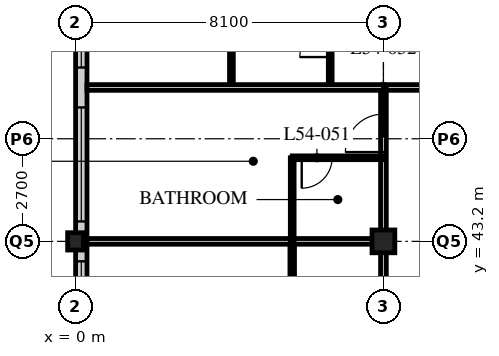
"""IFC4 building model, lengths in metres.
Left out: names, types, materials, properties, quantities, classifications, styles, units other than length and angle.
Written with IfcOpenShell. Run it as: python <this file> out.ifc"""

import sys

from ifc_helpers import new_model, si_unit, direction, frame, frame_2d, origin, origin_2d, place, context, subcontext, project, spatial, rectangle, hollow_rectangle, i_section, extrude, element, fill, save


model = new_model("IFC4")
c1 = context("Model", 3, precision=1e-05, world=origin(), true_north=direction((0.0, 1.0)))
c2 = subcontext(c1, "Body", "Model", "MODEL_VIEW")
j1 = project(units=[si_unit("LENGTHUNIT", "METRE"), si_unit("PLANEANGLEUNIT", "RADIAN")], contexts=[c1])
p1 = place(None, origin())
s1 = spatial("IfcSite", under=j1, at=p1, CompositionType="ELEMENT")
p2 = place(p1, origin())
s2 = spatial("IfcBuilding", under=s1, at=p2, CompositionType="ELEMENT")
p3 = place(p2, frame((0.0, 0.0, 210.0)))
s3 = spatial("IfcBuildingStorey", under=s2, at=p3, CompositionType="ELEMENT", Elevation=210.0)
p4 = place(p3, frame((0.0, 43.2, 0.0), z_axis=(0.0, 0.0, 1.0), x_axis=(1.0, 0.0, 0.0)))
e1 = element("IfcColumn", 1, at=p4, inside=s3, PredefinedType="COLUMN", context=c2, shape_type="SweptSolid", body=[
    extrude(i_section(OverallWidth=0.418, OverallDepth=0.456, WebThickness=0.042, FlangeThickness=0.067, FilletRadius=0.015, at=origin_2d()), origin(), (0.0, 0.0, 1.0), 3.6),
])
p5 = place(p3, frame((8.1, 43.2, 0.0), z_axis=(0.0, 0.0, 1.0), x_axis=(1.0, 0.0, 0.0)))
e2 = element("IfcColumn", 2, at=p5, inside=s3, PredefinedType="COLUMN", context=c2, shape_type="SweptSolid", body=[
    extrude(hollow_rectangle(XDim=0.6, YDim=0.6, WallThickness=0.05, at=origin_2d()), origin(), (0.0, 0.0, 1.0), 3.6),
])
p6 = place(p3, frame((0.15, 51.0, 0.0), z_axis=(0.0, 0.0, 1.0), x_axis=(0.0, -1.0, 0.0)))
e3 = element("IfcWall", 3, at=p6, inside=s3, PredefinedType="SOLIDWALL", context=c2, shape_type="SweptSolid", body=[
    extrude(rectangle(XDim=32.1, YDim=0.3, at=frame_2d((16.05, 0.0))), origin(), (0.0, 0.0, 1.0), 3.39),
])
p7 = place(p6, frame((0.225, 0.0, 0.6)))
e4 = element("IfcOpeningElement", 4, at=p7, cuts=e3, PredefinedType="OPENING", context=c2, shape_type="SweptSolid", body=[
    extrude(rectangle(XDim=3.0, YDim=2.4, at=frame_2d((1.5, 1.2))), frame((0.0, 0.16, 0.0), z_axis=(0.0, -1.0, 0.0), x_axis=(1.0, 0.0, 0.0)), (0.0, 0.0, 1.0), 0.32),
])
p8 = place(p6, frame((4.275, 0.0, 0.6)))
e5 = element("IfcOpeningElement", 5, at=p8, cuts=e3, PredefinedType="OPENING", context=c2, shape_type="SweptSolid", body=[
    extrude(rectangle(XDim=3.0, YDim=2.4, at=frame_2d((1.5, 1.2))), frame((0.0, 0.16, 0.0), z_axis=(0.0, -1.0, 0.0), x_axis=(1.0, 0.0, 0.0)), (0.0, 0.0, 1.0), 0.32),
])
p9 = place(p6, frame((8.325, 0.0, 0.6)))
e6 = element("IfcOpeningElement", 6, at=p9, cuts=e3, PredefinedType="OPENING", context=c2, shape_type="SweptSolid", body=[
    extrude(rectangle(XDim=3.0, YDim=2.4, at=frame_2d((1.5, 1.2))), frame((0.0, 0.16, 0.0), z_axis=(0.0, -1.0, 0.0), x_axis=(1.0, 0.0, 0.0)), (0.0, 0.0, 1.0), 0.32),
])
p10 = place(p6, frame((12.375, 0.0, 0.6)))
e7 = element("IfcOpeningElement", 7, at=p10, cuts=e3, PredefinedType="OPENING", context=c2, shape_type="SweptSolid", body=[
    extrude(rectangle(XDim=3.0, YDim=2.4, at=frame_2d((1.5, 1.2))), frame((0.0, 0.16, 0.0), z_axis=(0.0, -1.0, 0.0), x_axis=(1.0, 0.0, 0.0)), (0.0, 0.0, 1.0), 0.32),
])
p11 = place(p6, frame((16.425, 0.0, 0.6)))
e8 = element("IfcOpeningElement", 8, at=p11, cuts=e3, PredefinedType="OPENING", context=c2, shape_type="SweptSolid", body=[
    extrude(rectangle(XDim=3.0, YDim=2.4, at=frame_2d((1.5, 1.2))), frame((0.0, 0.16, 0.0), z_axis=(0.0, -1.0, 0.0), x_axis=(1.0, 0.0, 0.0)), (0.0, 0.0, 1.0), 0.32),
])
p12 = place(p6, frame((20.475, 0.0, 0.6)))
e9 = element("IfcOpeningElement", 9, at=p12, cuts=e3, PredefinedType="OPENING", context=c2, shape_type="SweptSolid", body=[
    extrude(rectangle(XDim=3.0, YDim=2.4, at=frame_2d((1.5, 1.2))), frame((0.0, 0.16, 0.0), z_axis=(0.0, -1.0, 0.0), x_axis=(1.0, 0.0, 0.0)), (0.0, 0.0, 1.0), 0.32),
])
p13 = place(p6, frame((24.525, 0.0, 0.6)))
e10 = element("IfcOpeningElement", 10, at=p13, cuts=e3, PredefinedType="OPENING", context=c2, shape_type="SweptSolid", body=[
    extrude(rectangle(XDim=3.0, YDim=2.4, at=frame_2d((1.5, 1.2))), frame((0.0, 0.16, 0.0), z_axis=(0.0, -1.0, 0.0), x_axis=(1.0, 0.0, 0.0)), (0.0, 0.0, 1.0), 0.32),
])
p14 = place(p6, frame((28.575, 0.0, 0.6)))
e11 = element("IfcOpeningElement", 11, at=p14, cuts=e3, PredefinedType="OPENING", context=c2, shape_type="SweptSolid", body=[
    extrude(rectangle(XDim=3.0, YDim=2.4, at=frame_2d((1.5, 1.2))), frame((0.0, 0.16, 0.0), z_axis=(0.0, -1.0, 0.0), x_axis=(1.0, 0.0, 0.0)), (0.0, 0.0, 1.0), 0.32),
])
p15 = place(p3, frame((8.1, 47.25, 0.0), z_axis=(0.0, 0.0, 1.0), x_axis=(1.0, 0.0, 0.0)))
e12 = element("IfcWall", 12, at=p15, inside=s3, PredefinedType="PARTITIONING", context=c2, shape_type="SweptSolid", body=[
    extrude(rectangle(XDim=36.45, YDim=0.15, at=frame_2d((18.225, 0.0))), origin(), (0.0, 0.0, 1.0), 3.39),
])
p16 = place(p15, frame((4.45, 0.0, 0.0)))
e13 = element("IfcOpeningElement", 13, at=p16, cuts=e12, PredefinedType="OPENING", context=c2, shape_type="SweptSolid", body=[
    extrude(rectangle(XDim=1.0, YDim=2.1, at=frame_2d((0.5, 1.05))), frame((0.0, 0.085, 0.0), z_axis=(0.0, -1.0, 0.0), x_axis=(1.0, 0.0, 0.0)), (0.0, 0.0, 1.0), 0.17),
])
p17 = place(p15, frame((12.55, 0.0, 0.0)))
e14 = element("IfcOpeningElement", 14, at=p17, cuts=e12, PredefinedType="OPENING", context=c2, shape_type="SweptSolid", body=[
    extrude(rectangle(XDim=1.0, YDim=2.1, at=frame_2d((0.5, 1.05))), frame((0.0, 0.085, 0.0), z_axis=(0.0, -1.0, 0.0), x_axis=(1.0, 0.0, 0.0)), (0.0, 0.0, 1.0), 0.17),
])
p18 = place(p15, frame((30.7, 0.0, 0.0)))
e15 = element("IfcOpeningElement", 15, at=p18, cuts=e12, PredefinedType="OPENING", context=c2, shape_type="SweptSolid", body=[
    extrude(rectangle(XDim=1.0, YDim=2.1, at=frame_2d((0.5, 1.05))), frame((0.0, 0.085, 0.0), z_axis=(0.0, -1.0, 0.0), x_axis=(1.0, 0.0, 0.0)), (0.0, 0.0, 1.0), 0.17),
])
p19 = place(p15, frame((33.925, 0.0, 0.0)))
e16 = element("IfcOpeningElement", 16, at=p19, cuts=e12, PredefinedType="OPENING", context=c2, shape_type="SweptSolid", body=[
    extrude(rectangle(XDim=1.0, YDim=2.1, at=frame_2d((0.5, 1.05))), frame((0.0, 0.085, 0.0), z_axis=(0.0, -1.0, 0.0), x_axis=(1.0, 0.0, 0.0)), (0.0, 0.0, 1.0), 0.17),
])
p20 = place(p15, frame((1.525, 0.0, 0.0)))
e17 = element("IfcOpeningElement", 17, at=p20, cuts=e12, PredefinedType="OPENING", context=c2, shape_type="SweptSolid", body=[
    extrude(rectangle(XDim=1.0, YDim=2.1, at=frame_2d((0.5, 1.05))), frame((0.0, 0.085, 0.0), z_axis=(0.0, -1.0, 0.0), x_axis=(1.0, 0.0, 0.0)), (0.0, 0.0, 1.0), 0.17),
])
p21 = place(p3, frame((8.1, 18.9, 0.0), z_axis=(0.0, 0.0, 1.0), x_axis=(0.0, 1.0, 0.0)))
e18 = element("IfcWall", 18, at=p21, inside=s3, PredefinedType="PARTITIONING", context=c2, shape_type="SweptSolid", body=[
    extrude(rectangle(XDim=28.35, YDim=0.15, at=frame_2d((14.175, 0.0))), origin(), (0.0, 0.0, 1.0), 2.778),
])
p22 = place(p21, frame((0.9, 0.0, 0.0)))
e19 = element("IfcOpeningElement", 19, at=p22, cuts=e18, PredefinedType="OPENING", context=c2, shape_type="SweptSolid", body=[
    extrude(rectangle(XDim=1.0, YDim=2.1, at=frame_2d((0.5, 1.05))), frame((0.0, 0.085, 0.0), z_axis=(0.0, -1.0, 0.0), x_axis=(1.0, 0.0, 0.0)), (0.0, 0.0, 1.0), 0.17),
])
p23 = place(p21, frame((17.1, 0.0, 0.0)))
e20 = element("IfcOpeningElement", 20, at=p23, cuts=e18, PredefinedType="OPENING", context=c2, shape_type="SweptSolid", body=[
    extrude(rectangle(XDim=1.0, YDim=2.1, at=frame_2d((0.5, 1.05))), frame((0.0, 0.085, 0.0), z_axis=(0.0, -1.0, 0.0), x_axis=(1.0, 0.0, 0.0)), (0.0, 0.0, 1.0), 0.17),
])
p24 = place(p21, frame((26.65, 0.0, 0.0)))
e21 = element("IfcOpeningElement", 21, at=p24, cuts=e18, PredefinedType="OPENING", context=c2, shape_type="SweptSolid", body=[
    extrude(rectangle(XDim=1.0, YDim=2.1, at=frame_2d((0.5, 1.05))), frame((0.0, 0.085, 0.0), z_axis=(0.0, -1.0, 0.0), x_axis=(1.0, 0.0, 0.0)), (0.0, 0.0, 1.0), 0.17),
])
p25 = place(p3, frame((5.7, 18.9, 0.0), z_axis=(0.0, 0.0, 1.0), x_axis=(0.0, 1.0, 0.0)))
e22 = element("IfcWall", 22, at=p25, inside=s3, PredefinedType="PARTITIONING", context=c2, shape_type="SweptSolid", body=[
    extrude(rectangle(XDim=24.3, YDim=0.12, at=frame_2d((12.15, 0.0))), origin(), (0.0, 0.0, 1.0), 3.39),
])
p26 = place(p25, frame((0.975, 0.0, 0.0)))
e23 = element("IfcOpeningElement", 23, at=p26, cuts=e22, PredefinedType="OPENING", context=c2, shape_type="SweptSolid", body=[
    extrude(rectangle(XDim=0.85, YDim=2.1, at=frame_2d((0.425, 1.05))), frame((0.0, 0.07, 0.0), z_axis=(0.0, -1.0, 0.0), x_axis=(1.0, 0.0, 0.0)), (0.0, 0.0, 1.0), 0.14),
])
p27 = place(p25, frame((8.425, 0.0, 0.0)))
e24 = element("IfcOpeningElement", 24, at=p27, cuts=e22, PredefinedType="OPENING", context=c2, shape_type="SweptSolid", body=[
    extrude(rectangle(XDim=0.85, YDim=2.1, at=frame_2d((0.425, 1.05))), frame((0.0, 0.07, 0.0), z_axis=(0.0, -1.0, 0.0), x_axis=(1.0, 0.0, 0.0)), (0.0, 0.0, 1.0), 0.14),
])
p28 = place(p25, frame((12.475, 0.0, 0.0)))
e25 = element("IfcOpeningElement", 25, at=p28, cuts=e22, PredefinedType="OPENING", context=c2, shape_type="SweptSolid", body=[
    extrude(rectangle(XDim=0.85, YDim=2.1, at=frame_2d((0.425, 1.05))), frame((0.0, 0.07, 0.0), z_axis=(0.0, -1.0, 0.0), x_axis=(1.0, 0.0, 0.0)), (0.0, 0.0, 1.0), 0.14),
])
p29 = place(p25, frame((17.175, 0.0, 0.0)))
e26 = element("IfcOpeningElement", 26, at=p29, cuts=e22, PredefinedType="OPENING", context=c2, shape_type="SweptSolid", body=[
    extrude(rectangle(XDim=0.85, YDim=2.1, at=frame_2d((0.425, 1.05))), frame((0.0, 0.07, 0.0), z_axis=(0.0, -1.0, 0.0), x_axis=(1.0, 0.0, 0.0)), (0.0, 0.0, 1.0), 0.14),
])
p30 = place(p25, frame((20.575, 0.0, 0.0)))
e27 = element("IfcOpeningElement", 27, at=p30, cuts=e22, PredefinedType="OPENING", context=c2, shape_type="SweptSolid", body=[
    extrude(rectangle(XDim=0.85, YDim=2.1, at=frame_2d((0.425, 1.05))), frame((0.0, 0.07, 0.0), z_axis=(0.0, -1.0, 0.0), x_axis=(1.0, 0.0, 0.0)), (0.0, 0.0, 1.0), 0.14),
])
p31 = place(p3, frame((8.1, 43.2, 0.0), z_axis=(0.0, 0.0, 1.0), x_axis=(-1.0, 0.0, 0.0)))
e28 = element("IfcWall", 28, at=p31, inside=s3, PredefinedType="PARTITIONING", context=c2, shape_type="SweptSolid", body=[
    extrude(rectangle(XDim=7.8, YDim=0.15, at=frame_2d((3.9, 0.0))), origin(), (0.0, 0.0, 1.0), 2.778),
])
p32 = place(p3, frame((5.7, 43.2, 0.0), z_axis=(0.0, 0.0, 1.0), x_axis=(0.0, 1.0, 0.0)))
e29 = element("IfcWall", 29, at=p32, inside=s3, PredefinedType="PARTITIONING", context=c2, shape_type="SweptSolid", body=[
    extrude(rectangle(XDim=2.2, YDim=0.1, at=frame_2d((1.1, 0.0))), origin(), (0.0, 0.0, 1.0), 3.39),
])
p33 = place(p3, frame((8.1, 45.4, 0.0), z_axis=(0.0, 0.0, 1.0), x_axis=(-1.0, 0.0, 0.0)))
e30 = element("IfcWall", 30, at=p33, inside=s3, PredefinedType="PARTITIONING", context=c2, shape_type="SweptSolid", body=[
    extrude(rectangle(XDim=2.4, YDim=0.1, at=frame_2d((1.2, 0.0))), origin(), (0.0, 0.0, 1.0), 3.39),
])
p34 = place(p33, frame((1.35, 0.0, 0.0)))
e31 = element("IfcOpeningElement", 31, at=p34, cuts=e30, PredefinedType="OPENING", context=c2, shape_type="SweptSolid", body=[
    extrude(rectangle(XDim=0.8, YDim=2.1, at=frame_2d((0.4, 1.05))), frame((0.0, 0.06, 0.0), z_axis=(0.0, -1.0, 0.0), x_axis=(1.0, 0.0, 0.0)), (0.0, 0.0, 1.0), 0.12),
])
p35 = place(p3, frame((6.7, 47.25, 0.0), z_axis=(0.0, 0.0, 1.0), x_axis=(0.0, 1.0, 0.0)))
e32 = element("IfcWall", 32, at=p35, inside=s3, PredefinedType="PARTITIONING", context=c2, shape_type="SweptSolid", body=[
    extrude(rectangle(XDim=2.4, YDim=0.1, at=frame_2d((1.2, 0.0))), origin(), (0.0, 0.0, 1.0), 3.39),
])
p36 = place(p35, frame((0.8, 0.0, 0.0)))
e33 = element("IfcOpeningElement", 33, at=p36, cuts=e32, PredefinedType="OPENING", context=c2, shape_type="SweptSolid", body=[
    extrude(rectangle(XDim=0.8, YDim=2.1, at=frame_2d((0.4, 1.05))), frame((0.0, 0.06, 0.0), z_axis=(0.0, -1.0, 0.0), x_axis=(1.0, 0.0, 0.0)), (0.0, 0.0, 1.0), 0.12),
])
p37 = place(p3, frame((4.1, 47.25, 0.0), z_axis=(0.0, 0.0, 1.0), x_axis=(0.0, 1.0, 0.0)))
e34 = element("IfcWall", 34, at=p37, inside=s3, PredefinedType="PARTITIONING", context=c2, shape_type="SweptSolid", body=[
    extrude(rectangle(XDim=2.4, YDim=0.1, at=frame_2d((1.2, 0.0))), origin(), (0.0, 0.0, 1.0), 3.39),
])
p38 = place(p3, frame((0.3, 47.25, 0.0), z_axis=(0.0, 0.0, 1.0), x_axis=(1.0, 0.0, 0.0)))
e35 = element("IfcWall", 35, at=p38, inside=s3, PredefinedType="PARTITIONING", context=c2, shape_type="SweptSolid", body=[
    extrude(rectangle(XDim=7.8, YDim=0.15, at=frame_2d((3.9, 0.0))), origin(), (0.0, 0.0, 1.0), 3.39),
])
p39 = place(p7, origin())
e36 = element("IfcWindow", 36, at=p39, inside=s3, PartitioningType="SINGLE_PANEL", PredefinedType="WINDOW", context=c2, shape_type="SweptSolid", body=[
    extrude(rectangle(XDim=3.0, YDim=2.4, at=frame_2d((1.5, 1.2))), frame((0.0, 0.03, 0.0), z_axis=(0.0, -1.0, 0.0), x_axis=(1.0, 0.0, 0.0)), (0.0, 0.0, 1.0), 0.06),
])
fill(e4, e36)
p40 = place(p8, origin())
e37 = element("IfcWindow", 37, at=p40, inside=s3, PartitioningType="SINGLE_PANEL", PredefinedType="WINDOW", context=c2, shape_type="SweptSolid", body=[
    extrude(rectangle(XDim=3.0, YDim=2.4, at=frame_2d((1.5, 1.2))), frame((0.0, 0.03, 0.0), z_axis=(0.0, -1.0, 0.0), x_axis=(1.0, 0.0, 0.0)), (0.0, 0.0, 1.0), 0.06),
])
fill(e5, e37)
p41 = place(p9, origin())
e38 = element("IfcWindow", 38, at=p41, inside=s3, PartitioningType="SINGLE_PANEL", PredefinedType="WINDOW", context=c2, shape_type="SweptSolid", body=[
    extrude(rectangle(XDim=3.0, YDim=2.4, at=frame_2d((1.5, 1.2))), frame((0.0, 0.03, 0.0), z_axis=(0.0, -1.0, 0.0), x_axis=(1.0, 0.0, 0.0)), (0.0, 0.0, 1.0), 0.06),
])
fill(e6, e38)
p42 = place(p34, origin())
e39 = element("IfcDoor", 39, at=p42, inside=s3, OperationType="SINGLE_SWING_RIGHT", PredefinedType="DOOR", context=c2, shape_type="SweptSolid", body=[
    extrude(rectangle(XDim=0.8, YDim=2.1, at=frame_2d((0.4, 1.05))), frame((0.0, 0.025, 0.0), z_axis=(0.0, -1.0, 0.0), x_axis=(1.0, 0.0, 0.0)), (0.0, 0.0, 1.0), 0.05),
])
fill(e31, e39)
p43 = place(p24, origin())
e40 = element("IfcDoor", 40, at=p43, inside=s3, OperationType="SINGLE_SWING_LEFT", PredefinedType="DOOR", context=c2, shape_type="SweptSolid", body=[
    extrude(rectangle(XDim=1.0, YDim=2.1, at=frame_2d((0.5, 1.05))), frame((0.0, 0.025, 0.0), z_axis=(0.0, -1.0, 0.0), x_axis=(1.0, 0.0, 0.0)), (0.0, 0.0, 1.0), 0.05),
])
fill(e21, e40)
p44 = place(p36, origin())
e41 = element("IfcDoor", 41, at=p44, inside=s3, OperationType="SINGLE_SWING_LEFT", PredefinedType="DOOR", context=c2, shape_type="SweptSolid", body=[
    extrude(rectangle(XDim=0.8, YDim=2.1, at=frame_2d((0.4, 1.05))), frame((0.0, 0.025, 0.0), z_axis=(0.0, -1.0, 0.0), x_axis=(1.0, 0.0, 0.0)), (0.0, 0.0, 1.0), 0.05),
])
fill(e33, e41)
save(model, sys.argv[1])
